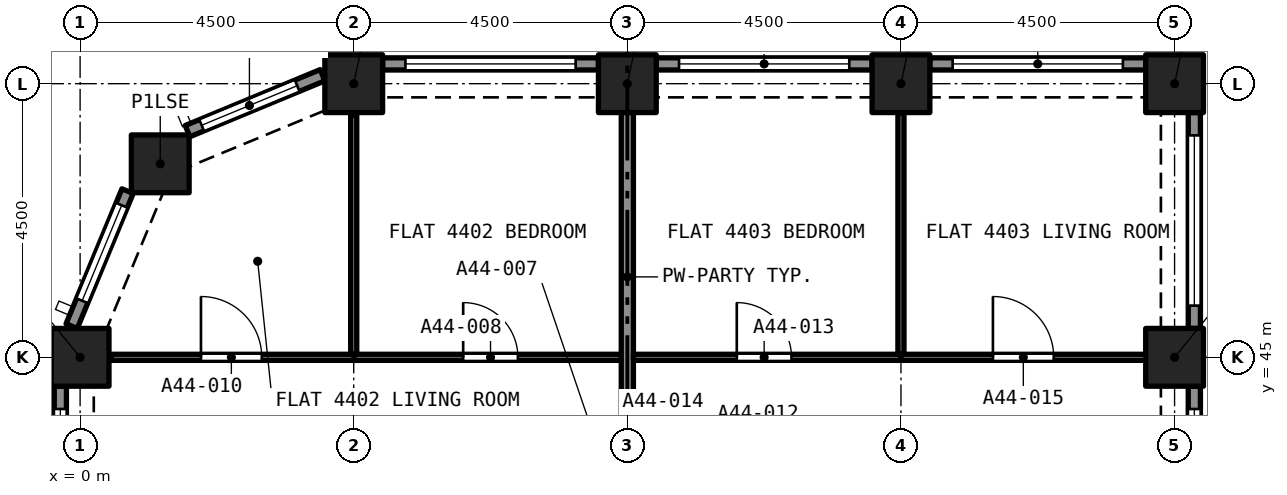
"""IFC4 building model, lengths in metres.
Left out: names, types, materials, properties, quantities, classifications, styles, units other than length and angle.
Written with IfcOpenShell. Run it as: python <this file> out.ifc"""

import sys

from ifc_helpers import new_model, si_unit, direction, frame, frame_2d, origin, origin_2d, place, context, subcontext, project, spatial, rectangle, extrude, element, fill, save


model = new_model("IFC4")
c1 = context("Model", 3, precision=1e-05, world=origin(), true_north=direction((0.0, 1.0)))
c2 = subcontext(c1, "Body", "Model", "MODEL_VIEW")
j1 = project(units=[si_unit("LENGTHUNIT", "METRE"), si_unit("PLANEANGLEUNIT", "RADIAN")], contexts=[c1])
p1 = place(None, origin())
s1 = spatial("IfcSite", under=j1, at=p1, CompositionType="ELEMENT")
p2 = place(p1, origin())
s2 = spatial("IfcBuilding", under=s1, at=p2, CompositionType="ELEMENT")
p3 = place(p2, frame((0.0, 0.0, 159.4)))
s3 = spatial("IfcBuildingStorey", under=s2, at=p3, CompositionType="ELEMENT", Elevation=159.4)
for number, where, z_axis, x_axis in (
    (1, (0.0, 45.0, 0.0), (0.0, 0.0, 1.0), (1.0, 0.0, 0.0)),
    (2, (18.0, 45.0, 0.0), (0.0, 0.0, 1.0), (1.0, 0.0, 0.0)),
    (3, (1.318, 48.182, 0.0), (0.0, 0.0, 1.0), (1.0, 0.0, 0.0)),
    (4, (4.5, 49.5, 0.0), (0.0, 0.0, 1.0), (1.0, 0.0, 0.0)),
    (5, (9.0, 49.5, 0.0), (0.0, 0.0, 1.0), (1.0, 0.0, 0.0)),
    (6, (13.5, 49.5, 0.0), (0.0, 0.0, 1.0), (1.0, 0.0, 0.0)),
    (7, (18.0, 49.5, 0.0), (0.0, 0.0, 1.0), (1.0, 0.0, 0.0)),
):
    element("IfcColumn", number, at=place(p3, frame(where, z_axis=z_axis, x_axis=x_axis)), inside=s3, PredefinedType="COLUMN", context=c2, shape_type="SweptSolid", body=[
        extrude(rectangle(XDim=0.95, YDim=0.95, at=origin_2d()), origin(), (0.0, 0.0, 1.0), 4.4),
    ])
p4 = place(p3, frame((13.975, 49.825, 0.0), z_axis=(0.0, 0.0, 1.0), x_axis=(1.0, 0.0, 0.0)))
e8 = element("IfcWall", 8, at=p4, inside=s3, PredefinedType="SOLIDWALL", context=c2, shape_type="SweptSolid", body=[
    extrude(rectangle(XDim=3.55, YDim=0.2, at=frame_2d((1.775, 0.0))), origin(), (0.0, 0.0, 1.0), 4.4),
])
p5 = place(p4, frame((0.375, 0.0, 0.45)))
e9 = element("IfcOpeningElement", 9, at=p5, cuts=e8, PredefinedType="OPENING", context=c2, shape_type="SweptSolid", body=[
    extrude(rectangle(XDim=2.8, YDim=2.55, at=frame_2d((1.4, 1.275))), frame((0.0, 0.11, 0.0), z_axis=(0.0, -1.0, 0.0), x_axis=(1.0, 0.0, 0.0)), (0.0, 0.0, 1.0), 0.22),
])
p6 = place(p3, frame((9.475, 49.825, 0.0), z_axis=(0.0, 0.0, 1.0), x_axis=(1.0, 0.0, 0.0)))
e10 = element("IfcWall", 10, at=p6, inside=s3, PredefinedType="SOLIDWALL", context=c2, shape_type="SweptSolid", body=[
    extrude(rectangle(XDim=3.55, YDim=0.2, at=frame_2d((1.775, 0.0))), origin(), (0.0, 0.0, 1.0), 4.4),
])
p7 = place(p6, frame((0.375, 0.0, 0.45)))
e11 = element("IfcOpeningElement", 11, at=p7, cuts=e10, PredefinedType="OPENING", context=c2, shape_type="SweptSolid", body=[
    extrude(rectangle(XDim=2.8, YDim=2.55, at=frame_2d((1.4, 1.275))), frame((0.0, 0.11, 0.0), z_axis=(0.0, -1.0, 0.0), x_axis=(1.0, 0.0, 0.0)), (0.0, 0.0, 1.0), 0.22),
])
p8 = place(p3, frame((4.975, 49.825, 0.0), z_axis=(0.0, 0.0, 1.0), x_axis=(1.0, 0.0, 0.0)))
e12 = element("IfcWall", 12, at=p8, inside=s3, PredefinedType="SOLIDWALL", context=c2, shape_type="SweptSolid", body=[
    extrude(rectangle(XDim=3.55, YDim=0.2, at=frame_2d((1.775, 0.0))), origin(), (0.0, 0.0, 1.0), 4.4),
])
p9 = place(p8, frame((0.375, 0.0, 0.45)))
e13 = element("IfcOpeningElement", 13, at=p9, cuts=e12, PredefinedType="OPENING", context=c2, shape_type="SweptSolid", body=[
    extrude(rectangle(XDim=2.8, YDim=2.55, at=frame_2d((1.4, 1.275))), frame((0.0, 0.11, 0.0), z_axis=(0.0, -1.0, 0.0), x_axis=(1.0, 0.0, 0.0)), (0.0, 0.0, 1.0), 0.22),
])
p10 = place(p3, frame((1.767, 48.72, 0.0), z_axis=(0.0, 0.0, 1.0), x_axis=(0.923880599843, 0.382680855588, 0.0)))
e14 = element("IfcWall", 14, at=p10, inside=s3, PredefinedType="SOLIDWALL", context=c2, shape_type="SweptSolid", body=[
    extrude(rectangle(XDim=2.403, YDim=0.2, at=frame_2d((1.201, 0.0))), origin(), (0.0, 0.0, 1.0), 4.4),
])
p11 = place(p10, frame((0.251, 0.0, 0.45)))
e15 = element("IfcOpeningElement", 15, at=p11, cuts=e14, PredefinedType="OPENING", context=c2, shape_type="SweptSolid", body=[
    extrude(rectangle(XDim=1.7, YDim=2.55, at=frame_2d((0.85, 1.275))), frame((0.0, 0.11, 0.0), z_axis=(0.0, -1.0, 0.0), x_axis=(1.0, 0.0, 0.0)), (0.0, 0.0, 1.0), 0.22),
])
p12 = place(p3, frame((-0.139, 45.513, 0.0), z_axis=(0.0, 0.0, 1.0), x_axis=(0.382680855588, 0.923880599843, 0.0)))
e16 = element("IfcWall", 16, at=p12, inside=s3, PredefinedType="SOLIDWALL", context=c2, shape_type="SweptSolid", body=[
    extrude(rectangle(XDim=2.403, YDim=0.2, at=frame_2d((1.201, 0.0))), origin(), (0.0, 0.0, 1.0), 4.4),
])
p13 = place(p12, frame((0.451, 0.0, 0.45)))
e17 = element("IfcOpeningElement", 17, at=p13, cuts=e16, PredefinedType="OPENING", context=c2, shape_type="SweptSolid", body=[
    extrude(rectangle(XDim=1.7, YDim=2.55, at=frame_2d((0.85, 1.275))), frame((0.0, 0.11, 0.0), z_axis=(0.0, -1.0, 0.0), x_axis=(1.0, 0.0, 0.0)), (0.0, 0.0, 1.0), 0.22),
])
p14 = place(p3, frame((-0.325, 40.975, 0.0), z_axis=(0.0, 0.0, 1.0), x_axis=(0.0, 1.0, 0.0)))
e18 = element("IfcWall", 18, at=p14, inside=s3, PredefinedType="SOLIDWALL", context=c2, shape_type="SweptSolid", body=[
    extrude(rectangle(XDim=3.55, YDim=0.2, at=frame_2d((1.775, 0.0))), origin(), (0.0, 0.0, 1.0), 4.4),
])
p15 = place(p14, frame((0.375, 0.0, 0.45)))
e19 = element("IfcOpeningElement", 19, at=p15, cuts=e18, PredefinedType="OPENING", context=c2, shape_type="SweptSolid", body=[
    extrude(rectangle(XDim=2.8, YDim=2.55, at=frame_2d((1.4, 1.275))), frame((0.0, 0.11, 0.0), z_axis=(0.0, -1.0, 0.0), x_axis=(1.0, 0.0, 0.0)), (0.0, 0.0, 1.0), 0.22),
])
p16 = place(p3, frame((18.325, 44.525, 0.0), z_axis=(0.0, 0.0, 1.0), x_axis=(0.0, -1.0, 0.0)))
e20 = element("IfcWall", 20, at=p16, inside=s3, PredefinedType="SOLIDWALL", context=c2, shape_type="SweptSolid", body=[
    extrude(rectangle(XDim=3.55, YDim=0.2, at=frame_2d((1.775, 0.0))), origin(), (0.0, 0.0, 1.0), 4.4),
])
p17 = place(p16, frame((0.375, 0.0, 0.45)))
e21 = element("IfcOpeningElement", 21, at=p17, cuts=e20, PredefinedType="OPENING", context=c2, shape_type="SweptSolid", body=[
    extrude(rectangle(XDim=2.8, YDim=2.55, at=frame_2d((1.4, 1.275))), frame((0.0, 0.11, 0.0), z_axis=(0.0, -1.0, 0.0), x_axis=(1.0, 0.0, 0.0)), (0.0, 0.0, 1.0), 0.22),
])
p18 = place(p3, frame((18.325, 49.025, 0.0), z_axis=(0.0, 0.0, 1.0), x_axis=(0.0, -1.0, 0.0)))
e22 = element("IfcWall", 22, at=p18, inside=s3, PredefinedType="SOLIDWALL", context=c2, shape_type="SweptSolid", body=[
    extrude(rectangle(XDim=3.55, YDim=0.2, at=frame_2d((1.775, 0.0))), origin(), (0.0, 0.0, 1.0), 4.4),
])
p19 = place(p18, frame((0.375, 0.0, 0.45)))
e23 = element("IfcOpeningElement", 23, at=p19, cuts=e22, PredefinedType="OPENING", context=c2, shape_type="SweptSolid", body=[
    extrude(rectangle(XDim=2.8, YDim=2.55, at=frame_2d((1.4, 1.275))), frame((0.0, 0.11, 0.0), z_axis=(0.0, -1.0, 0.0), x_axis=(1.0, 0.0, 0.0)), (0.0, 0.0, 1.0), 0.22),
])
p20 = place(p3, frame((4.5, 45.0, 0.0), z_axis=(0.0, 0.0, 1.0), x_axis=(1.0, 0.0, 0.0)))
e24 = element("IfcWall", 24, at=p20, inside=s3, PredefinedType="PARTITIONING", context=c2, shape_type="SweptSolid", body=[
    extrude(rectangle(XDim=4.4, YDim=0.1, at=frame_2d((2.2, 0.0))), origin(), (0.0, 0.0, 1.0), 4.1),
])
p21 = place(p20, frame((1.8, 0.0, 0.0)))
e25 = element("IfcOpeningElement", 25, at=p21, cuts=e24, PredefinedType="OPENING", context=c2, shape_type="SweptSolid", body=[
    extrude(rectangle(XDim=0.9, YDim=2.1, at=frame_2d((0.45, 1.05))), frame((0.0, 0.06, 0.0), z_axis=(0.0, -1.0, 0.0), x_axis=(1.0, 0.0, 0.0)), (0.0, 0.0, 1.0), 0.12),
])
p22 = place(p3, frame((4.5, 45.05, 0.0), z_axis=(0.0, 0.0, 1.0), x_axis=(0.0, 1.0, 0.0)))
e26 = element("IfcWall", 26, at=p22, inside=s3, PredefinedType="PARTITIONING", context=c2, shape_type="SweptSolid", body=[
    extrude(rectangle(XDim=3.936, YDim=0.1, at=frame_2d((1.968, 0.0))), origin(), (0.0, 0.0, 1.0), 4.1),
])
p23 = place(p3, frame((0.514, 45.0, 0.0), z_axis=(0.0, 0.0, 1.0), x_axis=(1.0, 0.0, 0.0)))
e27 = element("IfcWall", 27, at=p23, inside=s3, PredefinedType="PARTITIONING", context=c2, shape_type="SweptSolid", body=[
    extrude(rectangle(XDim=3.986, YDim=0.1, at=frame_2d((1.993, 0.0))), origin(), (0.0, 0.0, 1.0), 4.1),
])
p24 = place(p23, frame((1.473, 0.0, 0.0)))
e28 = element("IfcOpeningElement", 28, at=p24, cuts=e27, PredefinedType="OPENING", context=c2, shape_type="SweptSolid", body=[
    extrude(rectangle(XDim=1.0, YDim=2.1, at=frame_2d((0.5, 1.05))), frame((0.0, 0.06, 0.0), z_axis=(0.0, -1.0, 0.0), x_axis=(1.0, 0.0, 0.0)), (0.0, 0.0, 1.0), 0.12),
])
p25 = place(p3, frame((9.0, 43.62, 0.0), z_axis=(0.0, 0.0, 1.0), x_axis=(0.0, 1.0, 0.0)))
e29 = element("IfcWall", 29, at=p25, inside=s3, PredefinedType="PARTITIONING", context=c2, shape_type="SweptSolid", body=[
    extrude(rectangle(XDim=5.405, YDim=0.2, at=frame_2d((2.702, 0.0))), origin(), (0.0, 0.0, 1.0), 4.1),
])
p26 = place(p3, frame((9.1, 45.0, 0.0), z_axis=(0.0, 0.0, 1.0), x_axis=(1.0, 0.0, 0.0)))
e30 = element("IfcWall", 30, at=p26, inside=s3, PredefinedType="PARTITIONING", context=c2, shape_type="SweptSolid", body=[
    extrude(rectangle(XDim=4.4, YDim=0.1, at=frame_2d((2.2, 0.0))), origin(), (0.0, 0.0, 1.0), 4.1),
])
p27 = place(p26, frame((1.7, 0.0, 0.0)))
e31 = element("IfcOpeningElement", 31, at=p27, cuts=e30, PredefinedType="OPENING", context=c2, shape_type="SweptSolid", body=[
    extrude(rectangle(XDim=0.9, YDim=2.1, at=frame_2d((0.45, 1.05))), frame((0.0, 0.06, 0.0), z_axis=(0.0, -1.0, 0.0), x_axis=(1.0, 0.0, 0.0)), (0.0, 0.0, 1.0), 0.12),
])
p28 = place(p3, frame((13.5, 45.05, 0.0), z_axis=(0.0, 0.0, 1.0), x_axis=(0.0, 1.0, 0.0)))
e32 = element("IfcWall", 32, at=p28, inside=s3, PredefinedType="PARTITIONING", context=c2, shape_type="SweptSolid", body=[
    extrude(rectangle(XDim=3.975, YDim=0.1, at=frame_2d((1.987, 0.0))), origin(), (0.0, 0.0, 1.0), 4.1),
])
p29 = place(p3, frame((13.5, 45.0, 0.0), z_axis=(0.0, 0.0, 1.0), x_axis=(1.0, 0.0, 0.0)))
e33 = element("IfcWall", 33, at=p29, inside=s3, PredefinedType="PARTITIONING", context=c2, shape_type="SweptSolid", body=[
    extrude(rectangle(XDim=4.025, YDim=0.1, at=frame_2d((2.012, 0.0))), origin(), (0.0, 0.0, 1.0), 4.1),
])
p30 = place(p29, frame((1.512, 0.0, 0.0)))
e34 = element("IfcOpeningElement", 34, at=p30, cuts=e33, PredefinedType="OPENING", context=c2, shape_type="SweptSolid", body=[
    extrude(rectangle(XDim=1.0, YDim=2.1, at=frame_2d((0.5, 1.05))), frame((0.0, 0.06, 0.0), z_axis=(0.0, -1.0, 0.0), x_axis=(1.0, 0.0, 0.0)), (0.0, 0.0, 1.0), 0.12),
])
p31 = place(p5, origin())
e35 = element("IfcWindow", 35, at=p31, inside=s3, PartitioningType="SINGLE_PANEL", PredefinedType="WINDOW", context=c2, shape_type="SweptSolid", body=[
    extrude(rectangle(XDim=2.8, YDim=2.55, at=frame_2d((1.4, 1.275))), frame((0.0, 0.03, 0.0), z_axis=(0.0, -1.0, 0.0), x_axis=(1.0, 0.0, 0.0)), (0.0, 0.0, 1.0), 0.06),
])
fill(e9, e35)
p32 = place(p7, origin())
e36 = element("IfcWindow", 36, at=p32, inside=s3, PartitioningType="SINGLE_PANEL", PredefinedType="WINDOW", context=c2, shape_type="SweptSolid", body=[
    extrude(rectangle(XDim=2.8, YDim=2.55, at=frame_2d((1.4, 1.275))), frame((0.0, 0.03, 0.0), z_axis=(0.0, -1.0, 0.0), x_axis=(1.0, 0.0, 0.0)), (0.0, 0.0, 1.0), 0.06),
])
fill(e11, e36)
p33 = place(p9, origin())
e37 = element("IfcWindow", 37, at=p33, inside=s3, PartitioningType="SINGLE_PANEL", PredefinedType="WINDOW", context=c2, shape_type="SweptSolid", body=[
    extrude(rectangle(XDim=2.8, YDim=2.55, at=frame_2d((1.4, 1.275))), frame((0.0, 0.03, 0.0), z_axis=(0.0, -1.0, 0.0), x_axis=(1.0, 0.0, 0.0)), (0.0, 0.0, 1.0), 0.06),
])
fill(e13, e37)
p34 = place(p11, origin())
e38 = element("IfcWindow", 38, at=p34, inside=s3, PartitioningType="SINGLE_PANEL", PredefinedType="WINDOW", context=c2, shape_type="SweptSolid", body=[
    extrude(rectangle(XDim=1.7, YDim=2.55, at=frame_2d((0.85, 1.275))), frame((0.0, 0.03, 0.0), z_axis=(0.0, -1.0, 0.0), x_axis=(1.0, 0.0, 0.0)), (0.0, 0.0, 1.0), 0.06),
])
fill(e15, e38)
p35 = place(p13, origin())
e39 = element("IfcWindow", 39, at=p35, inside=s3, PartitioningType="SINGLE_PANEL", PredefinedType="WINDOW", context=c2, shape_type="SweptSolid", body=[
    extrude(rectangle(XDim=1.7, YDim=2.55, at=frame_2d((0.85, 1.275))), frame((0.0, 0.03, 0.0), z_axis=(0.0, -1.0, 0.0), x_axis=(1.0, 0.0, 0.0)), (0.0, 0.0, 1.0), 0.06),
])
fill(e17, e39)
p36 = place(p15, origin())
e40 = element("IfcWindow", 40, at=p36, inside=s3, PartitioningType="SINGLE_PANEL", PredefinedType="WINDOW", context=c2, shape_type="SweptSolid", body=[
    extrude(rectangle(XDim=2.8, YDim=2.55, at=frame_2d((1.4, 1.275))), frame((0.0, 0.03, 0.0), z_axis=(0.0, -1.0, 0.0), x_axis=(1.0, 0.0, 0.0)), (0.0, 0.0, 1.0), 0.06),
])
fill(e19, e40)
p37 = place(p17, origin())
e41 = element("IfcWindow", 41, at=p37, inside=s3, PartitioningType="SINGLE_PANEL", PredefinedType="WINDOW", context=c2, shape_type="SweptSolid", body=[
    extrude(rectangle(XDim=2.8, YDim=2.55, at=frame_2d((1.4, 1.275))), frame((0.0, 0.03, 0.0), z_axis=(0.0, -1.0, 0.0), x_axis=(1.0, 0.0, 0.0)), (0.0, 0.0, 1.0), 0.06),
])
fill(e21, e41)
p38 = place(p19, origin())
e42 = element("IfcWindow", 42, at=p38, inside=s3, PartitioningType="SINGLE_PANEL", PredefinedType="WINDOW", context=c2, shape_type="SweptSolid", body=[
    extrude(rectangle(XDim=2.8, YDim=2.55, at=frame_2d((1.4, 1.275))), frame((0.0, 0.03, 0.0), z_axis=(0.0, -1.0, 0.0), x_axis=(1.0, 0.0, 0.0)), (0.0, 0.0, 1.0), 0.06),
])
fill(e23, e42)
p39 = place(p21, origin())
e43 = element("IfcDoor", 43, at=p39, inside=s3, OperationType="SINGLE_SWING_RIGHT", PredefinedType="DOOR", context=c2, shape_type="SweptSolid", body=[
    extrude(rectangle(XDim=0.9, YDim=2.1, at=frame_2d((0.45, 1.05))), frame((0.0, 0.025, 0.0), z_axis=(0.0, -1.0, 0.0), x_axis=(1.0, 0.0, 0.0)), (0.0, 0.0, 1.0), 0.05),
])
fill(e25, e43)
p40 = place(p24, origin())
e44 = element("IfcDoor", 44, at=p40, inside=s3, OperationType="SINGLE_SWING_LEFT", PredefinedType="DOOR", context=c2, shape_type="SweptSolid", body=[
    extrude(rectangle(XDim=1.0, YDim=2.1, at=frame_2d((0.5, 1.05))), frame((0.0, 0.025, 0.0), z_axis=(0.0, -1.0, 0.0), x_axis=(1.0, 0.0, 0.0)), (0.0, 0.0, 1.0), 0.05),
])
fill(e28, e44)
p41 = place(p27, origin())
e45 = element("IfcDoor", 45, at=p41, inside=s3, OperationType="SINGLE_SWING_LEFT", PredefinedType="DOOR", context=c2, shape_type="SweptSolid", body=[
    extrude(rectangle(XDim=0.9, YDim=2.1, at=frame_2d((0.45, 1.05))), frame((0.0, 0.025, 0.0), z_axis=(0.0, -1.0, 0.0), x_axis=(1.0, 0.0, 0.0)), (0.0, 0.0, 1.0), 0.05),
])
fill(e31, e45)
p42 = place(p30, origin())
e46 = element("IfcDoor", 46, at=p42, inside=s3, OperationType="SINGLE_SWING_RIGHT", PredefinedType="DOOR", context=c2, shape_type="SweptSolid", body=[
    extrude(rectangle(XDim=1.0, YDim=2.1, at=frame_2d((0.5, 1.05))), frame((0.0, 0.025, 0.0), z_axis=(0.0, -1.0, 0.0), x_axis=(1.0, 0.0, 0.0)), (0.0, 0.0, 1.0), 0.05),
])
fill(e34, e46)
save(model, sys.argv[1])
